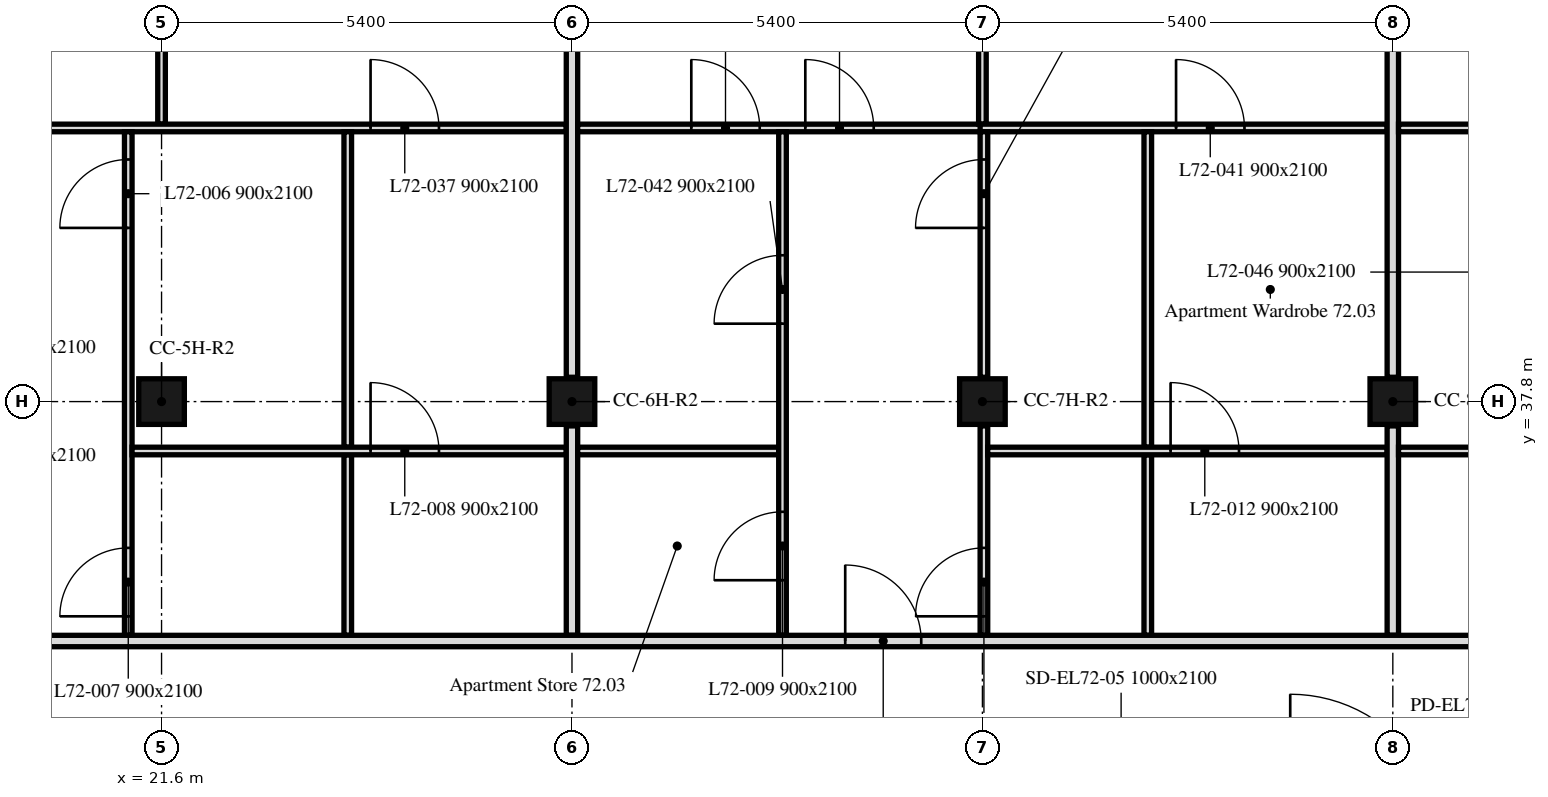
"""IFC4 building model, lengths in metres.
Left out: names, types, materials, properties, quantities, classifications, styles, units other than length and angle.
Written with IfcOpenShell. Run it as: python <this file> out.ifc"""

import sys

from ifc_helpers import new_model, si_unit, direction, frame, frame_2d, origin, origin_2d, place, context, subcontext, project, spatial, rectangle, extrude, element, fill, save


model = new_model("IFC4")
c1 = context("Model", 3, precision=1e-05, world=origin(), true_north=direction((0.0, 1.0)))
c2 = subcontext(c1, "Body", "Model", "MODEL_VIEW")
j1 = project(units=[si_unit("LENGTHUNIT", "METRE"), si_unit("PLANEANGLEUNIT", "RADIAN")], contexts=[c1])
p1 = place(None, origin())
s1 = spatial("IfcSite", under=j1, at=p1, CompositionType="ELEMENT")
p2 = place(p1, origin())
s2 = spatial("IfcBuilding", under=s1, at=p2, CompositionType="ELEMENT")
p3 = place(p2, frame((0.0, 0.0, 291.7)))
s3 = spatial("IfcBuildingStorey", under=s2, at=p3, CompositionType="ELEMENT", Elevation=291.7)
for number, where, z_axis, x_axis in (
    (1, (21.6, 37.8, 0.0), (0.0, 0.0, 1.0), (1.0, 0.0, 0.0)),
    (2, (27.0, 37.8, 0.0), (0.0, 0.0, 1.0), (1.0, 0.0, 0.0)),
    (3, (32.4, 37.8, 0.0), (0.0, 0.0, 1.0), (1.0, 0.0, 0.0)),
    (4, (37.8, 37.8, 0.0), (0.0, 0.0, 1.0), (1.0, 0.0, 0.0)),
):
    element("IfcColumn", number, at=place(p3, frame(where, z_axis=z_axis, x_axis=x_axis)), inside=s3, PredefinedType="COLUMN", context=c2, shape_type="SweptSolid", body=[
        extrude(rectangle(XDim=0.6, YDim=0.6, at=origin_2d()), origin(), (0.0, 0.0, 1.0), 3.0),
    ])
p4 = place(p3, frame((21.6, 41.45, 0.0), z_axis=(0.0, 0.0, 1.0), x_axis=(0.0, 1.0, 0.0)))
e5 = element("IfcWall", 5, at=p4, inside=s3, PredefinedType="PARTITIONING", context=c2, shape_type="SweptSolid", body=[
    extrude(rectangle(XDim=1.43, YDim=0.1, at=frame_2d((0.715, 0.0))), origin(), (0.0, 0.0, 1.0), 2.4),
])
p5 = place(p3, frame((16.275, 41.4, 0.0), z_axis=(0.0, 0.0, 1.0), x_axis=(1.0, 0.0, 0.0)))
e6 = element("IfcWall", 6, at=p5, inside=s3, PredefinedType="PARTITIONING", context=c2, shape_type="SweptSolid", body=[
    extrude(rectangle(XDim=10.65, YDim=0.1, at=frame_2d((5.325, 0.0))), origin(), (0.0, 0.0, 1.0), 2.4),
])
p6 = place(p5, frame((0.937, 0.0, 0.0)))
e7 = element("IfcOpeningElement", 7, at=p6, cuts=e6, PredefinedType="OPENING", context=c2, shape_type="SweptSolid", body=[
    extrude(rectangle(XDim=0.9, YDim=2.1, at=frame_2d((0.45, 1.05))), frame((0.0, 0.05, 0.0), z_axis=(0.0, -1.0, 0.0), x_axis=(1.0, 0.0, 0.0)), (0.0, 0.0, 1.0), 0.1),
])
p7 = place(p5, frame((8.075, 0.0, 0.0)))
e8 = element("IfcOpeningElement", 8, at=p7, cuts=e6, PredefinedType="OPENING", context=c2, shape_type="SweptSolid", body=[
    extrude(rectangle(XDim=0.9, YDim=2.1, at=frame_2d((0.45, 1.05))), frame((0.0, 0.05, 0.0), z_axis=(0.0, -1.0, 0.0), x_axis=(1.0, 0.0, 0.0)), (0.0, 0.0, 1.0), 0.1),
])
p8 = place(p5, frame((2.437, 0.0, 0.0)))
e9 = element("IfcOpeningElement", 9, at=p8, cuts=e6, PredefinedType="OPENING", context=c2, shape_type="SweptSolid", body=[
    extrude(rectangle(XDim=0.9, YDim=2.1, at=frame_2d((0.45, 1.05))), frame((0.0, 0.05, 0.0), z_axis=(0.0, -1.0, 0.0), x_axis=(1.0, 0.0, 0.0)), (0.0, 0.0, 1.0), 0.1),
])
p9 = place(p3, frame((21.162, 34.725, 0.0), z_axis=(0.0, 0.0, 1.0), x_axis=(0.0, 1.0, 0.0)))
e10 = element("IfcWall", 10, at=p9, inside=s3, PredefinedType="PARTITIONING", context=c2, shape_type="SweptSolid", body=[
    extrude(rectangle(XDim=6.625, YDim=0.1, at=frame_2d((3.312, 0.0))), origin(), (0.0, 0.0, 1.0), 3.0),
])
p10 = place(p9, frame((5.36, 0.0, 0.0)))
e11 = element("IfcOpeningElement", 11, at=p10, cuts=e10, PredefinedType="OPENING", context=c2, shape_type="SweptSolid", body=[
    extrude(rectangle(XDim=0.9, YDim=2.1, at=frame_2d((0.45, 1.05))), frame((0.0, 0.05, 0.0), z_axis=(0.0, -1.0, 0.0), x_axis=(1.0, 0.0, 0.0)), (0.0, 0.0, 1.0), 0.1),
])
p11 = place(p9, frame((0.25, 0.0, 0.0)))
e12 = element("IfcOpeningElement", 12, at=p11, cuts=e10, PredefinedType="OPENING", context=c2, shape_type="SweptSolid", body=[
    extrude(rectangle(XDim=0.9, YDim=2.1, at=frame_2d((0.45, 1.05))), frame((0.0, 0.05, 0.0), z_axis=(0.0, -1.0, 0.0), x_axis=(1.0, 0.0, 0.0)), (0.0, 0.0, 1.0), 0.1),
])
p12 = place(p3, frame((24.05, 37.2, 0.0), z_axis=(0.0, 0.0, 1.0), x_axis=(0.0, 1.0, 0.0)))
e13 = element("IfcWall", 13, at=p12, inside=s3, PredefinedType="PARTITIONING", context=c2, shape_type="SweptSolid", body=[
    extrude(rectangle(XDim=4.15, YDim=0.1, at=frame_2d((2.075, 0.0))), origin(), (0.0, 0.0, 1.0), 3.0),
])
p13 = place(p3, frame((24.05, 34.725, 0.0), z_axis=(0.0, 0.0, 1.0), x_axis=(0.0, 1.0, 0.0)))
e14 = element("IfcWall", 14, at=p13, inside=s3, PredefinedType="PARTITIONING", context=c2, shape_type="SweptSolid", body=[
    extrude(rectangle(XDim=2.375, YDim=0.1, at=frame_2d((1.188, 0.0))), origin(), (0.0, 0.0, 1.0), 3.0),
])
p14 = place(p3, frame((21.212, 37.15, 0.0), z_axis=(0.0, 0.0, 1.0), x_axis=(1.0, 0.0, 0.0)))
e15 = element("IfcWall", 15, at=p14, inside=s3, PredefinedType="PARTITIONING", context=c2, shape_type="SweptSolid", body=[
    extrude(rectangle(XDim=5.713, YDim=0.1, at=frame_2d((2.856, 0.0))), origin(), (0.0, 0.0, 1.0), 2.4),
])
p15 = place(p14, frame((3.138, 0.0, 0.0)))
e16 = element("IfcOpeningElement", 16, at=p15, cuts=e15, PredefinedType="OPENING", context=c2, shape_type="SweptSolid", body=[
    extrude(rectangle(XDim=0.9, YDim=2.1, at=frame_2d((0.45, 1.05))), frame((0.0, 0.05, 0.0), z_axis=(0.0, -1.0, 0.0), x_axis=(1.0, 0.0, 0.0)), (0.0, 0.0, 1.0), 0.1),
])
p16 = place(p3, frame((27.0, 38.12, 0.0), z_axis=(0.0, 0.0, 1.0), x_axis=(0.0, 1.0, 0.0)))
e17 = element("IfcWall", 17, at=p16, inside=s3, PredefinedType="PARTITIONING", context=c2, shape_type="SweptSolid", body=[
    extrude(rectangle(XDim=4.76, YDim=0.15, at=frame_2d((2.38, 0.0))), origin(), (0.0, 0.0, 1.0), 2.4),
])
p17 = place(p3, frame((27.0, 34.725, 0.0), z_axis=(0.0, 0.0, 1.0), x_axis=(0.0, 1.0, 0.0)))
e18 = element("IfcWall", 18, at=p17, inside=s3, PredefinedType="PARTITIONING", context=c2, shape_type="SweptSolid", body=[
    extrude(rectangle(XDim=2.755, YDim=0.15, at=frame_2d((1.377, 0.0))), origin(), (0.0, 0.0, 1.0), 2.4),
])
p18 = place(p3, frame((27.075, 41.4, 0.0), z_axis=(0.0, 0.0, 1.0), x_axis=(1.0, 0.0, 0.0)))
e19 = element("IfcWall", 19, at=p18, inside=s3, PredefinedType="PARTITIONING", context=c2, shape_type="SweptSolid", body=[
    extrude(rectangle(XDim=5.375, YDim=0.1, at=frame_2d((2.688, 0.0))), origin(), (0.0, 0.0, 1.0), 3.0),
])
p19 = place(p18, frame((1.495, 0.0, 0.0)))
e20 = element("IfcOpeningElement", 20, at=p19, cuts=e19, PredefinedType="OPENING", context=c2, shape_type="SweptSolid", body=[
    extrude(rectangle(XDim=0.9, YDim=2.1, at=frame_2d((0.45, 1.05))), frame((0.0, 0.05, 0.0), z_axis=(0.0, -1.0, 0.0), x_axis=(1.0, 0.0, 0.0)), (0.0, 0.0, 1.0), 0.1),
])
p20 = place(p18, frame((2.995, 0.0, 0.0)))
e21 = element("IfcOpeningElement", 21, at=p20, cuts=e19, PredefinedType="OPENING", context=c2, shape_type="SweptSolid", body=[
    extrude(rectangle(XDim=0.9, YDim=2.1, at=frame_2d((0.45, 1.05))), frame((0.0, 0.05, 0.0), z_axis=(0.0, -1.0, 0.0), x_axis=(1.0, 0.0, 0.0)), (0.0, 0.0, 1.0), 0.1),
])
p21 = place(p3, frame((32.4, 41.45, 0.0), z_axis=(0.0, 0.0, 1.0), x_axis=(0.0, 1.0, 0.0)))
e22 = element("IfcWall", 22, at=p21, inside=s3, PredefinedType="PARTITIONING", context=c2, shape_type="SweptSolid", body=[
    extrude(rectangle(XDim=1.43, YDim=0.1, at=frame_2d((0.715, 0.0))), origin(), (0.0, 0.0, 1.0), 2.4),
])
p22 = place(p3, frame((32.37, 41.4, 0.0), z_axis=(0.0, 0.0, 1.0), x_axis=(1.0, 0.0, 0.0)))
e23 = element("IfcWall", 23, at=p22, inside=s3, PredefinedType="PARTITIONING", context=c2, shape_type="SweptSolid", body=[
    extrude(rectangle(XDim=5.355, YDim=0.1, at=frame_2d((2.677, 0.0))), origin(), (0.0, 0.0, 1.0), 3.0),
])
p23 = place(p22, frame((2.578, 0.0, 0.0)))
e24 = element("IfcOpeningElement", 24, at=p23, cuts=e23, PredefinedType="OPENING", context=c2, shape_type="SweptSolid", body=[
    extrude(rectangle(XDim=0.9, YDim=2.1, at=frame_2d((0.45, 1.05))), frame((0.0, 0.05, 0.0), z_axis=(0.0, -1.0, 0.0), x_axis=(1.0, 0.0, 0.0)), (0.0, 0.0, 1.0), 0.1),
])
p24 = place(p3, frame((27.075, 37.15, 0.0), z_axis=(0.0, 0.0, 1.0), x_axis=(1.0, 0.0, 0.0)))
e25 = element("IfcWall", 25, at=p24, inside=s3, PredefinedType="PARTITIONING", context=c2, shape_type="SweptSolid", body=[
    extrude(rectangle(XDim=2.645, YDim=0.1, at=frame_2d((1.323, 0.0))), origin(), (0.0, 0.0, 1.0), 3.0),
])
p25 = place(p3, frame((29.77, 34.725, 0.0), z_axis=(0.0, 0.0, 1.0), x_axis=(0.0, 1.0, 0.0)))
e26 = element("IfcWall", 26, at=p25, inside=s3, PredefinedType="PARTITIONING", context=c2, shape_type="SweptSolid", body=[
    extrude(rectangle(XDim=6.625, YDim=0.1, at=frame_2d((3.312, 0.0))), origin(), (0.0, 0.0, 1.0), 3.0),
])
p26 = place(p25, frame((0.725, 0.0, 0.0)))
e27 = element("IfcOpeningElement", 27, at=p26, cuts=e26, PredefinedType="OPENING", context=c2, shape_type="SweptSolid", body=[
    extrude(rectangle(XDim=0.9, YDim=2.1, at=frame_2d((0.45, 1.05))), frame((0.0, 0.05, 0.0), z_axis=(0.0, -1.0, 0.0), x_axis=(1.0, 0.0, 0.0)), (0.0, 0.0, 1.0), 0.1),
])
p27 = place(p25, frame((4.1, 0.0, 0.0)))
e28 = element("IfcOpeningElement", 28, at=p27, cuts=e26, PredefinedType="OPENING", context=c2, shape_type="SweptSolid", body=[
    extrude(rectangle(XDim=0.9, YDim=2.1, at=frame_2d((0.45, 1.05))), frame((0.0, 0.05, 0.0), z_axis=(0.0, -1.0, 0.0), x_axis=(1.0, 0.0, 0.0)), (0.0, 0.0, 1.0), 0.1),
])
p28 = place(p3, frame((32.42, 34.725, 0.0), z_axis=(0.0, 0.0, 1.0), x_axis=(0.0, 1.0, 0.0)))
e29 = element("IfcWall", 29, at=p28, inside=s3, PredefinedType="PARTITIONING", context=c2, shape_type="SweptSolid", body=[
    extrude(rectangle(XDim=2.755, YDim=0.1, at=frame_2d((1.377, 0.0))), origin(), (0.0, 0.0, 1.0), 2.4),
])
p29 = place(p28, frame((0.25, 0.0, 0.0)))
e30 = element("IfcOpeningElement", 30, at=p29, cuts=e29, PredefinedType="OPENING", context=c2, shape_type="SweptSolid", body=[
    extrude(rectangle(XDim=0.9, YDim=2.1, at=frame_2d((0.45, 1.05))), frame((0.0, 0.05, 0.0), z_axis=(0.0, -1.0, 0.0), x_axis=(1.0, 0.0, 0.0)), (0.0, 0.0, 1.0), 0.1),
])
p30 = place(p3, frame((32.42, 38.12, 0.0), z_axis=(0.0, 0.0, 1.0), x_axis=(0.0, 1.0, 0.0)))
e31 = element("IfcWall", 31, at=p30, inside=s3, PredefinedType="PARTITIONING", context=c2, shape_type="SweptSolid", body=[
    extrude(rectangle(XDim=3.23, YDim=0.1, at=frame_2d((1.615, 0.0))), origin(), (0.0, 0.0, 1.0), 2.4),
])
p31 = place(p30, frame((1.965, 0.0, 0.0)))
e32 = element("IfcOpeningElement", 32, at=p31, cuts=e31, PredefinedType="OPENING", context=c2, shape_type="SweptSolid", body=[
    extrude(rectangle(XDim=0.9, YDim=2.1, at=frame_2d((0.45, 1.05))), frame((0.0, 0.05, 0.0), z_axis=(0.0, -1.0, 0.0), x_axis=(1.0, 0.0, 0.0)), (0.0, 0.0, 1.0), 0.1),
])
p32 = place(p3, frame((34.576, 37.2, 0.0), z_axis=(0.0, 0.0, 1.0), x_axis=(0.0, 1.0, 0.0)))
e33 = element("IfcWall", 33, at=p32, inside=s3, PredefinedType="PARTITIONING", context=c2, shape_type="SweptSolid", body=[
    extrude(rectangle(XDim=4.15, YDim=0.1, at=frame_2d((2.075, 0.0))), origin(), (0.0, 0.0, 1.0), 2.4),
])
p33 = place(p3, frame((34.576, 34.725, 0.0), z_axis=(0.0, 0.0, 1.0), x_axis=(0.0, 1.0, 0.0)))
e34 = element("IfcWall", 34, at=p33, inside=s3, PredefinedType="PARTITIONING", context=c2, shape_type="SweptSolid", body=[
    extrude(rectangle(XDim=2.375, YDim=0.1, at=frame_2d((1.188, 0.0))), origin(), (0.0, 0.0, 1.0), 3.0),
])
p34 = place(p3, frame((32.47, 37.15, 0.0), z_axis=(0.0, 0.0, 1.0), x_axis=(1.0, 0.0, 0.0)))
e35 = element("IfcWall", 35, at=p34, inside=s3, PredefinedType="PARTITIONING", context=c2, shape_type="SweptSolid", body=[
    extrude(rectangle(XDim=5.255, YDim=0.1, at=frame_2d((2.627, 0.0))), origin(), (0.0, 0.0, 1.0), 3.0),
])
p35 = place(p34, frame((2.406, 0.0, 0.0)))
e36 = element("IfcOpeningElement", 36, at=p35, cuts=e35, PredefinedType="OPENING", context=c2, shape_type="SweptSolid", body=[
    extrude(rectangle(XDim=0.9, YDim=2.1, at=frame_2d((0.45, 1.05))), frame((0.0, 0.05, 0.0), z_axis=(0.0, -1.0, 0.0), x_axis=(1.0, 0.0, 0.0)), (0.0, 0.0, 1.0), 0.1),
])
p36 = place(p3, frame((37.8, 38.12, 0.0), z_axis=(0.0, 0.0, 1.0), x_axis=(0.0, 1.0, 0.0)))
e37 = element("IfcWall", 37, at=p36, inside=s3, PredefinedType="PARTITIONING", context=c2, shape_type="SweptSolid", body=[
    extrude(rectangle(XDim=4.76, YDim=0.15, at=frame_2d((2.38, 0.0))), origin(), (0.0, 0.0, 1.0), 2.4),
])
p37 = place(p3, frame((37.8, 34.725, 0.0), z_axis=(0.0, 0.0, 1.0), x_axis=(0.0, 1.0, 0.0)))
e38 = element("IfcWall", 38, at=p37, inside=s3, PredefinedType="PARTITIONING", context=c2, shape_type="SweptSolid", body=[
    extrude(rectangle(XDim=2.755, YDim=0.15, at=frame_2d((1.377, 0.0))), origin(), (0.0, 0.0, 1.0), 2.4),
])
p38 = place(p3, frame((37.875, 41.4, 0.0), z_axis=(0.0, 0.0, 1.0), x_axis=(1.0, 0.0, 0.0)))
e39 = element("IfcWall", 39, at=p38, inside=s3, PredefinedType="PARTITIONING", context=c2, shape_type="SweptSolid", body=[
    extrude(rectangle(XDim=9.974, YDim=0.1, at=frame_2d((4.987, 0.0))), origin(), (0.0, 0.0, 1.0), 3.0),
])
p39 = place(p38, frame((1.256, 0.0, 0.0)))
e40 = element("IfcOpeningElement", 40, at=p39, cuts=e39, PredefinedType="OPENING", context=c2, shape_type="SweptSolid", body=[
    extrude(rectangle(XDim=0.9, YDim=2.1, at=frame_2d((0.45, 1.05))), frame((0.0, 0.05, 0.0), z_axis=(0.0, -1.0, 0.0), x_axis=(1.0, 0.0, 0.0)), (0.0, 0.0, 1.0), 0.1),
])
p40 = place(p38, frame((7.995, 0.0, 0.0)))
e41 = element("IfcOpeningElement", 41, at=p40, cuts=e39, PredefinedType="OPENING", context=c2, shape_type="SweptSolid", body=[
    extrude(rectangle(XDim=0.9, YDim=2.1, at=frame_2d((0.45, 1.05))), frame((0.0, 0.05, 0.0), z_axis=(0.0, -1.0, 0.0), x_axis=(1.0, 0.0, 0.0)), (0.0, 0.0, 1.0), 0.1),
])
p41 = place(p38, frame((3.29, 0.0, 0.0)))
e42 = element("IfcOpeningElement", 42, at=p41, cuts=e39, PredefinedType="OPENING", context=c2, shape_type="SweptSolid", body=[
    extrude(rectangle(XDim=0.9, YDim=2.1, at=frame_2d((0.45, 1.05))), frame((0.0, 0.05, 0.0), z_axis=(0.0, -1.0, 0.0), x_axis=(1.0, 0.0, 0.0)), (0.0, 0.0, 1.0), 0.1),
])
p42 = place(p3, frame((37.875, 37.15, 0.0), z_axis=(0.0, 0.0, 1.0), x_axis=(1.0, 0.0, 0.0)))
e43 = element("IfcWall", 43, at=p42, inside=s3, PredefinedType="PARTITIONING", context=c2, shape_type="SweptSolid", body=[
    extrude(rectangle(XDim=2.406, YDim=0.1, at=frame_2d((1.203, 0.0))), origin(), (0.0, 0.0, 1.0), 3.0),
])
p43 = place(p3, frame((6.151, 34.65, 0.0), z_axis=(0.0, 0.0, 1.0), x_axis=(1.0, 0.0, 0.0)))
e44 = element("IfcWall", 44, at=p43, inside=s3, PredefinedType="PARTITIONING", context=c2, shape_type="SweptSolid", body=[
    extrude(rectangle(XDim=41.698, YDim=0.15, at=frame_2d((20.849, 0.0))), origin(), (0.0, 0.0, 1.0), 2.4),
])
p44 = place(p43, frame((2.969, 0.0, 0.0)))
e45 = element("IfcOpeningElement", 45, at=p44, cuts=e44, PredefinedType="OPENING", context=c2, shape_type="SweptSolid", body=[
    extrude(rectangle(XDim=1.0, YDim=2.1, at=frame_2d((0.5, 1.05))), frame((0.0, 0.075, 0.0), z_axis=(0.0, -1.0, 0.0), x_axis=(1.0, 0.0, 0.0)), (0.0, 0.0, 1.0), 0.15),
])
p45 = place(p43, frame((12.944, 0.0, 0.0)))
e46 = element("IfcOpeningElement", 46, at=p45, cuts=e44, PredefinedType="OPENING", context=c2, shape_type="SweptSolid", body=[
    extrude(rectangle(XDim=1.0, YDim=2.1, at=frame_2d((0.5, 1.05))), frame((0.0, 0.075, 0.0), z_axis=(0.0, -1.0, 0.0), x_axis=(1.0, 0.0, 0.0)), (0.0, 0.0, 1.0), 0.15),
])
p46 = place(p43, frame((24.444, 0.0, 0.0)))
e47 = element("IfcOpeningElement", 47, at=p46, cuts=e44, PredefinedType="OPENING", context=c2, shape_type="SweptSolid", body=[
    extrude(rectangle(XDim=1.0, YDim=2.1, at=frame_2d((0.5, 1.05))), frame((0.0, 0.075, 0.0), z_axis=(0.0, -1.0, 0.0), x_axis=(1.0, 0.0, 0.0)), (0.0, 0.0, 1.0), 0.15),
])
p47 = place(p43, frame((34.964, 0.0, 0.0)))
e48 = element("IfcOpeningElement", 48, at=p47, cuts=e44, PredefinedType="OPENING", context=c2, shape_type="SweptSolid", body=[
    extrude(rectangle(XDim=1.0, YDim=2.1, at=frame_2d((0.5, 1.05))), frame((0.0, 0.075, 0.0), z_axis=(0.0, -1.0, 0.0), x_axis=(1.0, 0.0, 0.0)), (0.0, 0.0, 1.0), 0.15),
])
p48 = place(p10, origin())
e49 = element("IfcDoor", 49, at=p48, inside=s3, OperationType="SINGLE_SWING_LEFT", PredefinedType="DOOR", context=c2, shape_type="SweptSolid", body=[
    extrude(rectangle(XDim=0.9, YDim=2.1, at=frame_2d((0.45, 1.05))), frame((0.0, 0.025, 0.0), z_axis=(0.0, -1.0, 0.0), x_axis=(1.0, 0.0, 0.0)), (0.0, 0.0, 1.0), 0.05),
])
fill(e11, e49)
p49 = place(p11, origin())
e50 = element("IfcDoor", 50, at=p49, inside=s3, OperationType="SINGLE_SWING_LEFT", PredefinedType="DOOR", context=c2, shape_type="SweptSolid", body=[
    extrude(rectangle(XDim=0.9, YDim=2.1, at=frame_2d((0.45, 1.05))), frame((0.0, 0.025, 0.0), z_axis=(0.0, -1.0, 0.0), x_axis=(1.0, 0.0, 0.0)), (0.0, 0.0, 1.0), 0.05),
])
fill(e12, e50)
p50 = place(p15, origin())
e51 = element("IfcDoor", 51, at=p50, inside=s3, OperationType="SINGLE_SWING_LEFT", PredefinedType="DOOR", context=c2, shape_type="SweptSolid", body=[
    extrude(rectangle(XDim=0.9, YDim=2.1, at=frame_2d((0.45, 1.05))), frame((0.0, 0.025, 0.0), z_axis=(0.0, -1.0, 0.0), x_axis=(1.0, 0.0, 0.0)), (0.0, 0.0, 1.0), 0.05),
])
fill(e16, e51)
p51 = place(p26, origin())
e52 = element("IfcDoor", 52, at=p51, inside=s3, OperationType="SINGLE_SWING_LEFT", PredefinedType="DOOR", context=c2, shape_type="SweptSolid", body=[
    extrude(rectangle(XDim=0.9, YDim=2.1, at=frame_2d((0.45, 1.05))), frame((0.0, 0.025, 0.0), z_axis=(0.0, -1.0, 0.0), x_axis=(1.0, 0.0, 0.0)), (0.0, 0.0, 1.0), 0.05),
])
fill(e27, e52)
p52 = place(p31, origin())
e53 = element("IfcDoor", 53, at=p52, inside=s3, OperationType="SINGLE_SWING_RIGHT", PredefinedType="DOOR", context=c2, shape_type="SweptSolid", body=[
    extrude(rectangle(XDim=0.9, YDim=2.1, at=frame_2d((0.45, 1.05))), frame((0.0, 0.025, 0.0), z_axis=(0.0, -1.0, 0.0), x_axis=(1.0, 0.0, 0.0)), (0.0, 0.0, 1.0), 0.05),
])
fill(e32, e53)
p53 = place(p29, origin())
e54 = element("IfcDoor", 54, at=p53, inside=s3, OperationType="SINGLE_SWING_RIGHT", PredefinedType="DOOR", context=c2, shape_type="SweptSolid", body=[
    extrude(rectangle(XDim=0.9, YDim=2.1, at=frame_2d((0.45, 1.05))), frame((0.0, 0.025, 0.0), z_axis=(0.0, -1.0, 0.0), x_axis=(1.0, 0.0, 0.0)), (0.0, 0.0, 1.0), 0.05),
])
fill(e30, e54)
p54 = place(p35, origin())
e55 = element("IfcDoor", 55, at=p54, inside=s3, OperationType="SINGLE_SWING_RIGHT", PredefinedType="DOOR", context=c2, shape_type="SweptSolid", body=[
    extrude(rectangle(XDim=0.9, YDim=2.1, at=frame_2d((0.45, 1.05))), frame((0.0, 0.025, 0.0), z_axis=(0.0, -1.0, 0.0), x_axis=(1.0, 0.0, 0.0)), (0.0, 0.0, 1.0), 0.05),
])
fill(e36, e55)
p55 = place(p7, origin())
e56 = element("IfcDoor", 56, at=p55, inside=s3, OperationType="SINGLE_SWING_RIGHT", PredefinedType="DOOR", context=c2, shape_type="SweptSolid", body=[
    extrude(rectangle(XDim=0.9, YDim=2.1, at=frame_2d((0.45, 1.05))), frame((0.0, 0.025, 0.0), z_axis=(0.0, -1.0, 0.0), x_axis=(1.0, 0.0, 0.0)), (0.0, 0.0, 1.0), 0.05),
])
fill(e8, e56)
p56 = place(p19, origin())
e57 = element("IfcDoor", 57, at=p56, inside=s3, OperationType="SINGLE_SWING_LEFT", PredefinedType="DOOR", context=c2, shape_type="SweptSolid", body=[
    extrude(rectangle(XDim=0.9, YDim=2.1, at=frame_2d((0.45, 1.05))), frame((0.0, 0.025, 0.0), z_axis=(0.0, -1.0, 0.0), x_axis=(1.0, 0.0, 0.0)), (0.0, 0.0, 1.0), 0.05),
])
fill(e20, e57)
p57 = place(p23, origin())
e58 = element("IfcDoor", 58, at=p57, inside=s3, OperationType="SINGLE_SWING_RIGHT", PredefinedType="DOOR", context=c2, shape_type="SweptSolid", body=[
    extrude(rectangle(XDim=0.9, YDim=2.1, at=frame_2d((0.45, 1.05))), frame((0.0, 0.025, 0.0), z_axis=(0.0, -1.0, 0.0), x_axis=(1.0, 0.0, 0.0)), (0.0, 0.0, 1.0), 0.05),
])
fill(e24, e58)
p58 = place(p27, origin())
e59 = element("IfcDoor", 59, at=p58, inside=s3, OperationType="SINGLE_SWING_RIGHT", PredefinedType="DOOR", context=c2, shape_type="SweptSolid", body=[
    extrude(rectangle(XDim=0.9, YDim=2.1, at=frame_2d((0.45, 1.05))), frame((0.0, 0.025, 0.0), z_axis=(0.0, -1.0, 0.0), x_axis=(1.0, 0.0, 0.0)), (0.0, 0.0, 1.0), 0.05),
])
fill(e28, e59)
p59 = place(p20, origin())
e60 = element("IfcDoor", 60, at=p59, inside=s3, OperationType="SINGLE_SWING_RIGHT", PredefinedType="DOOR", context=c2, shape_type="SweptSolid", body=[
    extrude(rectangle(XDim=0.9, YDim=2.1, at=frame_2d((0.45, 1.05))), frame((0.0, 0.025, 0.0), z_axis=(0.0, -1.0, 0.0), x_axis=(1.0, 0.0, 0.0)), (0.0, 0.0, 1.0), 0.05),
])
fill(e21, e60)
p60 = place(p46, origin())
e61 = element("IfcDoor", 61, at=p60, inside=s3, OperationType="SINGLE_SWING_LEFT", PredefinedType="DOOR", context=c2, shape_type="SweptSolid", body=[
    extrude(rectangle(XDim=1.0, YDim=2.1, at=frame_2d((0.5, 1.05))), frame((0.0, 0.025, 0.0), z_axis=(0.0, -1.0, 0.0), x_axis=(1.0, 0.0, 0.0)), (0.0, 0.0, 1.0), 0.05),
])
fill(e47, e61)
save(model, sys.argv[1])
